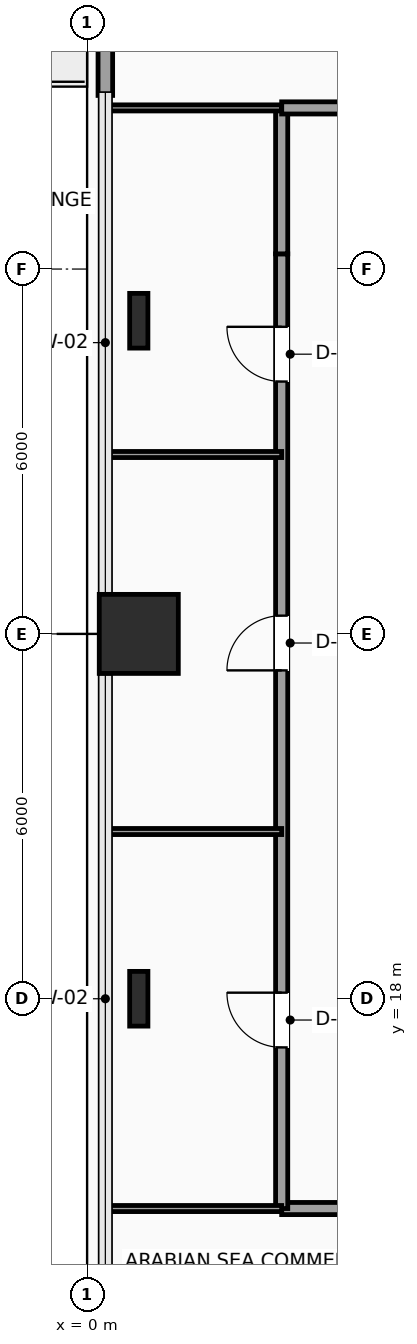
"""IFC4 building model, lengths in metres.
Left out: names, types, materials, properties, quantities, classifications, styles, units other than length and angle.
Written with IfcOpenShell. Run it as: python <this file> out.ifc"""

import sys

from ifc_helpers import new_model, si_unit, direction, frame, frame_2d, origin, origin_2d, place, context, subcontext, project, spatial, rectangle, i_section, extrude, element, fill, save


model = new_model("IFC4")
c1 = context("Model", 3, precision=1e-05, world=origin(), true_north=direction((0.0, 1.0)))
c2 = subcontext(c1, "Body", "Model", "MODEL_VIEW")
j1 = project(units=[si_unit("LENGTHUNIT", "METRE"), si_unit("PLANEANGLEUNIT", "RADIAN")], contexts=[c1])
p1 = place(None, origin())
s1 = spatial("IfcSite", under=j1, at=p1, CompositionType="ELEMENT")
p2 = place(p1, origin())
s2 = spatial("IfcBuilding", under=s1, at=p2, CompositionType="ELEMENT")
p3 = place(p2, frame((0.0, 0.0, 90.9)))
s3 = spatial("IfcBuildingStorey", under=s2, at=p3, CompositionType="ELEMENT", Elevation=90.9)
p4 = place(p3, frame((0.85, 18.0, 0.0), z_axis=(0.0, 0.0, 1.0), x_axis=(1.0, 0.0, 0.0)))
e1 = element("IfcColumn", 1, at=p4, inside=s3, PredefinedType="COLUMN", context=c2, shape_type="SweptSolid", body=[
    extrude(i_section(OverallWidth=0.3, OverallDepth=0.9, WebThickness=0.019, FlangeThickness=0.035, FilletRadius=0.03, at=origin_2d()), origin(), (0.0, 0.0, 1.0), 3.9),
])
p5 = place(p3, frame((0.85, 24.0, 0.0), z_axis=(0.0, 0.0, 1.0), x_axis=(1.0, 0.0, 0.0)))
e2 = element("IfcColumn", 2, at=p5, inside=s3, PredefinedType="COLUMN", context=c2, shape_type="SweptSolid", body=[
    extrude(rectangle(XDim=1.3, YDim=1.3, at=origin_2d()), origin(), (0.0, 0.0, 1.0), 3.9),
])
p6 = place(p3, frame((0.85, 29.15, 0.0), z_axis=(0.0, 0.0, 1.0), x_axis=(1.0, 0.0, 0.0)))
e3 = element("IfcColumn", 3, at=p6, inside=s3, PredefinedType="COLUMN", context=c2, shape_type="SweptSolid", body=[
    extrude(i_section(OverallWidth=0.3, OverallDepth=0.9, WebThickness=0.019, FlangeThickness=0.035, FilletRadius=0.03, at=origin_2d()), origin(), (0.0, 0.0, 1.0), 3.9),
])
p7 = place(p3, frame((0.3, 32.855, 0.0), z_axis=(0.0, 0.0, 1.0), x_axis=(0.0, 1.0, 0.0)))
e4 = element("IfcWall", 4, at=p7, inside=s3, PredefinedType="SOLIDWALL", context=c2, shape_type="SweptSolid", body=[
    extrude(rectangle(XDim=9.29, YDim=0.24, at=frame_2d((4.645, 0.0))), origin(), (0.0, 0.0, 1.0), 3.575),
])
p8 = place(p7, frame((4.2, 0.0, 0.0)))
e5 = element("IfcOpeningElement", 5, at=p8, cuts=e4, PredefinedType="OPENING", context=c2, shape_type="SweptSolid", body=[
    extrude(rectangle(XDim=1.05, YDim=2.2, at=frame_2d((0.525, 1.1))), frame((0.0, 0.13, 0.0), z_axis=(0.0, -1.0, 0.0), x_axis=(1.0, 0.0, 0.0)), (0.0, 0.0, 1.0), 0.26),
])
p9 = place(p3, frame((5.15, 14.55, 0.0), z_axis=(0.0, 0.0, 1.0), x_axis=(-1.0, 0.0, 0.0)))
e6 = element("IfcWall", 6, at=p9, inside=s3, PredefinedType="SOLIDWALL", context=c2, shape_type="SweptSolid", body=[
    extrude(rectangle(XDim=1.95, YDim=0.2, at=frame_2d((0.975, 0.0))), origin(), (0.0, 0.0, 1.0), 3.575),
])
p10 = place(p3, frame((3.2, 14.55, 0.0), z_axis=(0.0, 0.0, 1.0), x_axis=(0.0, 1.0, 0.0)))
e7 = element("IfcWall", 7, at=p10, inside=s3, PredefinedType="SOLIDWALL", context=c2, shape_type="SweptSolid", body=[
    extrude(rectangle(XDim=15.7, YDim=0.2, at=frame_2d((7.85, 0.0))), origin(), (0.0, 0.0, 1.0), 3.575),
])
p11 = place(p10, frame((2.65, 0.0, 0.0)))
e8 = element("IfcOpeningElement", 8, at=p11, cuts=e7, PredefinedType="OPENING", context=c2, shape_type="SweptSolid", body=[
    extrude(rectangle(XDim=0.9, YDim=2.1, at=frame_2d((0.45, 1.05))), frame((0.0, 0.11, 0.0), z_axis=(0.0, -1.0, 0.0), x_axis=(1.0, 0.0, 0.0)), (0.0, 0.0, 1.0), 0.22),
])
p12 = place(p10, frame((8.85, 0.0, 0.0)))
e9 = element("IfcOpeningElement", 9, at=p12, cuts=e7, PredefinedType="OPENING", context=c2, shape_type="SweptSolid", body=[
    extrude(rectangle(XDim=0.9, YDim=2.1, at=frame_2d((0.45, 1.05))), frame((0.0, 0.11, 0.0), z_axis=(0.0, -1.0, 0.0), x_axis=(1.0, 0.0, 0.0)), (0.0, 0.0, 1.0), 0.22),
])
p13 = place(p10, frame((13.6, 0.0, 0.0)))
e10 = element("IfcOpeningElement", 10, at=p13, cuts=e7, PredefinedType="OPENING", context=c2, shape_type="SweptSolid", body=[
    extrude(rectangle(XDim=0.9, YDim=2.1, at=frame_2d((0.45, 1.05))), frame((0.0, 0.11, 0.0), z_axis=(0.0, -1.0, 0.0), x_axis=(1.0, 0.0, 0.0)), (0.0, 0.0, 1.0), 0.22),
])
p14 = place(p3, frame((3.2, 30.25, 0.0), z_axis=(0.0, 0.0, 1.0), x_axis=(0.0, 1.0, 0.0)))
e11 = element("IfcWall", 11, at=p14, inside=s3, PredefinedType="SOLIDWALL", context=c2, shape_type="SweptSolid", body=[
    extrude(rectangle(XDim=2.4, YDim=0.2, at=frame_2d((1.2, 0.0))), origin(), (0.0, 0.0, 1.0), 3.575),
])
p15 = place(p3, frame((3.2, 32.65, 0.0), z_axis=(0.0, 0.0, 1.0), x_axis=(1.0, 0.0, 0.0)))
e12 = element("IfcWall", 12, at=p15, inside=s3, PredefinedType="SOLIDWALL", context=c2, shape_type="SweptSolid", body=[
    extrude(rectangle(XDim=2.05, YDim=0.2, at=frame_2d((1.025, 0.0))), origin(), (0.0, 0.0, 1.0), 3.575),
])
p16 = place(p3, frame((0.35, 0.35, 0.0), z_axis=(0.0, 0.0, 1.0), x_axis=(-0.003524555588, 0.999993788735, 0.0)))
e13 = element("IfcWall", 13, at=p16, inside=s3, PredefinedType="PARTITIONING", context=c2, shape_type="SweptSolid", body=[
    extrude(rectangle(XDim=14.2, YDim=0.1, at=frame_2d((7.1, 0.0))), origin(), (0.0, 0.0, 1.0), 3.575),
])
for number, where, z_axis, x_axis in (
    (14, (0.3, 14.55, 0.0), (0.0, 0.0, 1.0), (1.0, 0.0, 0.0)),
    (15, (0.3, 20.75, 0.0), (0.0, 0.0, 1.0), (1.0, 0.0, 0.0)),
    (16, (0.3, 26.95, 0.0), (0.0, 0.0, 1.0), (1.0, 0.0, 0.0)),
    (17, (0.3, 32.65, 0.0), (0.0, 0.0, 1.0), (1.0, 0.0, 0.0)),
):
    element("IfcWall", number, at=place(p3, frame(where, z_axis=z_axis, x_axis=x_axis)), inside=s3, PredefinedType="PARTITIONING", context=c2, shape_type="SweptSolid", body=[
        extrude(rectangle(XDim=2.9, YDim=0.1, at=frame_2d((1.45, 0.0))), origin(), (0.0, 0.0, 1.0), 3.575),
    ])
p17 = place(p11, origin())
e18 = element("IfcDoor", 18, at=p17, inside=s3, OperationType="SINGLE_SWING_RIGHT", PredefinedType="DOOR", context=c2, shape_type="SweptSolid", body=[
    extrude(rectangle(XDim=0.9, YDim=2.1, at=frame_2d((0.45, 1.05))), frame((0.0, 0.025, 0.0), z_axis=(0.0, -1.0, 0.0), x_axis=(1.0, 0.0, 0.0)), (0.0, 0.0, 1.0), 0.05),
])
fill(e8, e18)
p18 = place(p12, origin())
e19 = element("IfcDoor", 19, at=p18, inside=s3, OperationType="SINGLE_SWING_LEFT", PredefinedType="DOOR", context=c2, shape_type="SweptSolid", body=[
    extrude(rectangle(XDim=0.9, YDim=2.1, at=frame_2d((0.45, 1.05))), frame((0.0, 0.025, 0.0), z_axis=(0.0, -1.0, 0.0), x_axis=(1.0, 0.0, 0.0)), (0.0, 0.0, 1.0), 0.05),
])
fill(e9, e19)
p19 = place(p13, origin())
e20 = element("IfcDoor", 20, at=p19, inside=s3, OperationType="SINGLE_SWING_RIGHT", PredefinedType="DOOR", context=c2, shape_type="SweptSolid", body=[
    extrude(rectangle(XDim=0.9, YDim=2.1, at=frame_2d((0.45, 1.05))), frame((0.0, 0.025, 0.0), z_axis=(0.0, -1.0, 0.0), x_axis=(1.0, 0.0, 0.0)), (0.0, 0.0, 1.0), 0.05),
])
fill(e10, e20)
save(model, sys.argv[1])
